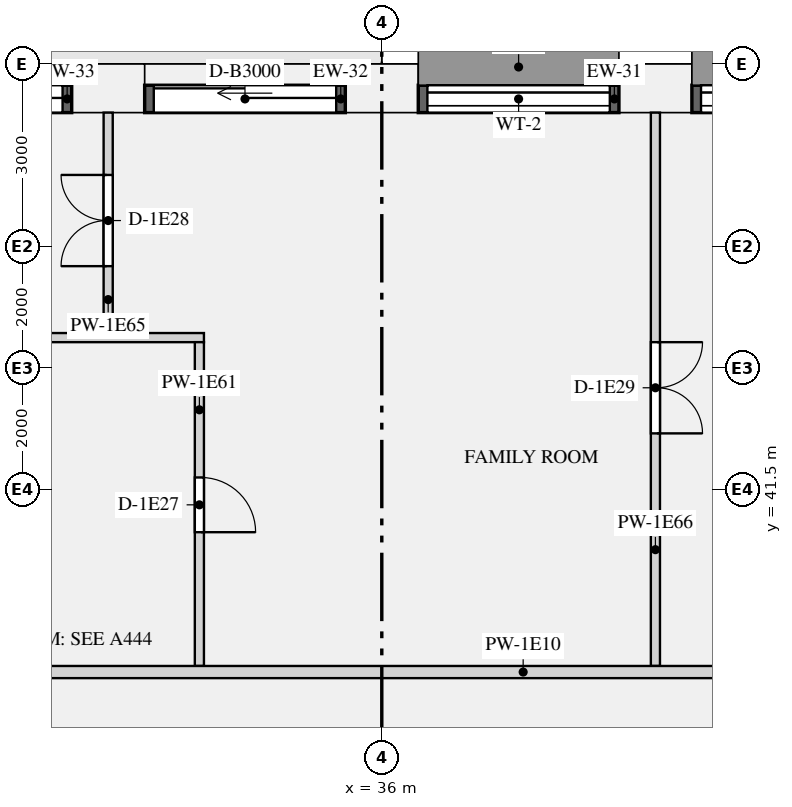
"""IFC4 building model, lengths in metres.
Left out: names, types, materials, properties, quantities, classifications, styles, units other than length and angle.
Written with IfcOpenShell. Run it as: python <this file> out.ifc"""

import sys

from ifc_helpers import new_model, si_unit, direction, frame, frame_2d, origin, origin_2d, place, context, subcontext, project, spatial, rectangle, extrude, element, fill, save


model = new_model("IFC4")
c1 = context("Model", 3, precision=1e-05, world=origin(), true_north=direction((0.0, 1.0)))
c2 = subcontext(c1, "Body", "Model", "MODEL_VIEW")
j1 = project(units=[si_unit("LENGTHUNIT", "METRE"), si_unit("PLANEANGLEUNIT", "RADIAN")], contexts=[c1])
p1 = place(None, origin())
s1 = spatial("IfcSite", under=j1, at=p1, CompositionType="ELEMENT")
p2 = place(p1, origin())
s2 = spatial("IfcBuilding", under=s1, at=p2, CompositionType="ELEMENT")
p3 = place(p2, frame((0.0, 0.0, 54.15)))
s3 = spatial("IfcBuildingStorey", under=s2, at=p3, CompositionType="ELEMENT", Elevation=54.15)
for number, where, z_axis, x_axis in (
    (1, (40.5, 48.1, 0.0), (0.0, 0.0, 1.0), (-1.0, 0.0, 0.0)),
    (2, (36.0, 48.1, 0.0), (0.0, 0.0, 1.0), (-1.0, 0.0, 0.0)),
    (3, (31.5, 48.1, 0.0), (0.0, 0.0, 1.0), (-1.0, 0.0, 0.0)),
):
    element("IfcColumn", number, at=place(p3, frame(where, z_axis=z_axis, x_axis=x_axis)), inside=s3, PredefinedType="USERDEFINED", context=c2, shape_type="SweptSolid", body=[
        extrude(rectangle(XDim=1.2, YDim=0.8, at=origin_2d()), origin(), (0.0, 0.0, 1.0), 3.15),
    ])
p4 = place(p3, frame((44.4, 47.925, 0.9), z_axis=(0.0, 0.0, 1.0), x_axis=(-1.0, 0.0, 0.0)))
e4 = element("IfcWall", 4, at=p4, inside=s3, PredefinedType="SOLIDWALL", context=c2, shape_type="SweptSolid", body=[
    extrude(rectangle(XDim=3.3, YDim=0.45, at=frame_2d((1.65, 0.0))), origin(), (0.0, 0.0, 1.0), 1.93),
])
p5 = place(p4, frame((0.15, 0.0, 0.15)))
e5 = element("IfcOpeningElement", 5, at=p5, cuts=e4, PredefinedType="OPENING", context=c2, shape_type="SweptSolid", body=[
    extrude(rectangle(XDim=3.0, YDim=1.5, at=frame_2d((1.5, 0.75))), frame((0.0, 0.235, 0.0), z_axis=(0.0, -1.0, 0.0), x_axis=(1.0, 0.0, 0.0)), (0.0, 0.0, 1.0), 0.47),
])
p6 = place(p3, frame((39.9, 47.925, 0.9), z_axis=(0.0, 0.0, 1.0), x_axis=(-1.0, 0.0, 0.0)))
e6 = element("IfcWall", 6, at=p6, inside=s3, PredefinedType="SOLIDWALL", context=c2, shape_type="SweptSolid", body=[
    extrude(rectangle(XDim=3.3, YDim=0.45, at=frame_2d((1.65, 0.0))), origin(), (0.0, 0.0, 1.0), 1.93),
])
p7 = place(p6, frame((0.15, 0.0, 0.15)))
e7 = element("IfcOpeningElement", 7, at=p7, cuts=e6, PredefinedType="OPENING", context=c2, shape_type="SweptSolid", body=[
    extrude(rectangle(XDim=3.0, YDim=1.5, at=frame_2d((1.5, 0.75))), frame((0.0, 0.235, 0.0), z_axis=(0.0, -1.0, 0.0), x_axis=(1.0, 0.0, 0.0)), (0.0, 0.0, 1.0), 0.47),
])
p8 = place(p3, frame((35.4, 47.925, 0.0), z_axis=(0.0, 0.0, 1.0), x_axis=(-1.0, 0.0, 0.0)))
e8 = element("IfcWall", 8, at=p8, inside=s3, PredefinedType="SOLIDWALL", context=c2, shape_type="SweptSolid", body=[
    extrude(rectangle(XDim=3.3, YDim=0.45, at=frame_2d((1.65, 0.0))), origin(), (0.0, 0.0, 1.0), 2.83),
])
p9 = place(p8, frame((0.15, 0.0, 0.0)))
e9 = element("IfcOpeningElement", 9, at=p9, cuts=e8, PredefinedType="OPENING", context=c2, shape_type="SweptSolid", body=[
    extrude(rectangle(XDim=3.0, YDim=2.3, at=frame_2d((1.5, 1.15))), frame((0.0, 0.235, 0.0), z_axis=(0.0, -1.0, 0.0), x_axis=(1.0, 0.0, 0.0)), (0.0, 0.0, 1.0), 0.47),
])
p10 = place(p3, frame((30.9, 47.925, 0.0), z_axis=(0.0, 0.0, 1.0), x_axis=(-1.0, 0.0, 0.0)))
e10 = element("IfcWall", 10, at=p10, inside=s3, PredefinedType="SOLIDWALL", context=c2, shape_type="SweptSolid", body=[
    extrude(rectangle(XDim=3.3, YDim=0.45, at=frame_2d((1.65, 0.0))), origin(), (0.0, 0.0, 1.0), 2.83),
])
p11 = place(p10, frame((0.15, 0.0, 0.0)))
e11 = element("IfcOpeningElement", 11, at=p11, cuts=e10, PredefinedType="OPENING", context=c2, shape_type="SweptSolid", body=[
    extrude(rectangle(XDim=3.0, YDim=2.3, at=frame_2d((1.5, 1.15))), frame((0.0, 0.235, 0.0), z_axis=(0.0, -1.0, 0.0), x_axis=(1.0, 0.0, 0.0)), (0.0, 0.0, 1.0), 0.47),
])
p12 = place(p3, frame((23.9, 38.5, 0.0), z_axis=(0.0, 0.0, 1.0), x_axis=(1.0, 0.0, 0.0)))
e12 = element("IfcWall", 12, at=p12, inside=s3, PredefinedType="PARTITIONING", context=c2, shape_type="SweptSolid", body=[
    extrude(rectangle(XDim=24.2, YDim=0.2, at=frame_2d((12.1, 0.0))), origin(), (0.0, 0.0, 1.0), 2.83),
])
p13 = place(p12, frame((3.55, 0.0, 0.0)))
e13 = element("IfcOpeningElement", 13, at=p13, cuts=e12, PredefinedType="OPENING", context=c2, shape_type="SweptSolid", body=[
    extrude(rectangle(XDim=1.1, YDim=2.1, at=frame_2d((0.55, 1.05))), frame((0.0, 0.11, 0.0), z_axis=(0.0, -1.0, 0.0), x_axis=(1.0, 0.0, 0.0)), (0.0, 0.0, 1.0), 0.22),
])
p14 = place(p3, frame((5.3, 44.0, 0.0), z_axis=(0.0, 0.0, 1.0), x_axis=(1.0, 0.0, 0.0)))
e14 = element("IfcWall", 14, at=p14, inside=s3, PredefinedType="PARTITIONING", context=c2, shape_type="SweptSolid", body=[
    extrude(rectangle(XDim=27.775, YDim=0.15, at=frame_2d((13.887, 0.0))), origin(), (0.0, 0.0, 1.0), 2.83),
])
p15 = place(p14, frame((14.5, 0.0, 0.0)))
e15 = element("IfcOpeningElement", 15, at=p15, cuts=e14, PredefinedType="OPENING", context=c2, shape_type="SweptSolid", body=[
    extrude(rectangle(XDim=0.9, YDim=2.1, at=frame_2d((0.45, 1.05))), frame((0.0, 0.085, 0.0), z_axis=(0.0, -1.0, 0.0), x_axis=(1.0, 0.0, 0.0)), (0.0, 0.0, 1.0), 0.17),
])
p16 = place(p14, frame((19.0, 0.0, 0.0)))
e16 = element("IfcOpeningElement", 16, at=p16, cuts=e14, PredefinedType="OPENING", context=c2, shape_type="SweptSolid", body=[
    extrude(rectangle(XDim=0.9, YDim=2.1, at=frame_2d((0.45, 1.05))), frame((0.0, 0.085, 0.0), z_axis=(0.0, -1.0, 0.0), x_axis=(1.0, 0.0, 0.0)), (0.0, 0.0, 1.0), 0.17),
])
p17 = place(p14, frame((9.35, 0.0, 0.0)))
e17 = element("IfcOpeningElement", 17, at=p17, cuts=e14, PredefinedType="OPENING", context=c2, shape_type="SweptSolid", body=[
    extrude(rectangle(XDim=0.9, YDim=2.1, at=frame_2d((0.45, 1.05))), frame((0.0, 0.085, 0.0), z_axis=(0.0, -1.0, 0.0), x_axis=(1.0, 0.0, 0.0)), (0.0, 0.0, 1.0), 0.17),
])
p18 = place(p14, frame((23.5, 0.0, 0.0)))
e18 = element("IfcOpeningElement", 18, at=p18, cuts=e14, PredefinedType="OPENING", context=c2, shape_type="SweptSolid", body=[
    extrude(rectangle(XDim=0.9, YDim=2.1, at=frame_2d((0.45, 1.05))), frame((0.0, 0.085, 0.0), z_axis=(0.0, -1.0, 0.0), x_axis=(1.0, 0.0, 0.0)), (0.0, 0.0, 1.0), 0.17),
])
p19 = place(p14, frame((1.325, 0.0, 0.0)))
e19 = element("IfcOpeningElement", 19, at=p19, cuts=e14, PredefinedType="OPENING", context=c2, shape_type="SweptSolid", body=[
    extrude(rectangle(XDim=0.9, YDim=2.1, at=frame_2d((0.45, 1.05))), frame((0.0, 0.085, 0.0), z_axis=(0.0, -1.0, 0.0), x_axis=(1.0, 0.0, 0.0)), (0.0, 0.0, 1.0), 0.17),
])
p20 = place(p3, frame((33.0, 38.6, 0.0), z_axis=(0.0, 0.0, 1.0), x_axis=(0.0, 1.0, 0.0)))
e20 = element("IfcWall", 20, at=p20, inside=s3, PredefinedType="PARTITIONING", context=c2, shape_type="SweptSolid", body=[
    extrude(rectangle(XDim=5.325, YDim=0.15, at=frame_2d((2.663, 0.0))), origin(), (0.0, 0.0, 1.0), 2.83),
])
p21 = place(p20, frame((2.2, 0.0, 0.0)))
e21 = element("IfcOpeningElement", 21, at=p21, cuts=e20, PredefinedType="OPENING", context=c2, shape_type="SweptSolid", body=[
    extrude(rectangle(XDim=0.9, YDim=2.1, at=frame_2d((0.45, 1.05))), frame((0.0, 0.085, 0.0), z_axis=(0.0, -1.0, 0.0), x_axis=(1.0, 0.0, 0.0)), (0.0, 0.0, 1.0), 0.17),
])
p22 = place(p3, frame((31.5, 44.075, 0.0), z_axis=(0.0, 0.0, 1.0), x_axis=(0.0, 1.0, 0.0)))
e22 = element("IfcWall", 22, at=p22, inside=s3, PredefinedType="PARTITIONING", context=c2, shape_type="SweptSolid", body=[
    extrude(rectangle(XDim=3.625, YDim=0.15, at=frame_2d((1.812, 0.0))), origin(), (0.0, 0.0, 1.0), 2.83),
])
p23 = place(p22, frame((1.1, 0.0, 0.0)))
e23 = element("IfcOpeningElement", 23, at=p23, cuts=e22, PredefinedType="OPENING", context=c2, shape_type="SweptSolid", body=[
    extrude(rectangle(XDim=1.5, YDim=2.1, at=frame_2d((0.75, 1.05))), frame((0.0, 0.085, 0.0), z_axis=(0.0, -1.0, 0.0), x_axis=(1.0, 0.0, 0.0)), (0.0, 0.0, 1.0), 0.17),
])
p24 = place(p3, frame((40.5, 38.6, 0.0), z_axis=(0.0, 0.0, 1.0), x_axis=(0.0, 1.0, 0.0)))
e24 = element("IfcWall", 24, at=p24, inside=s3, PredefinedType="PARTITIONING", context=c2, shape_type="SweptSolid", body=[
    extrude(rectangle(XDim=9.1, YDim=0.15, at=frame_2d((4.55, 0.0))), origin(), (0.0, 0.0, 1.0), 2.83),
])
p25 = place(p24, frame((3.825, 0.0, 0.0)))
e25 = element("IfcOpeningElement", 25, at=p25, cuts=e24, PredefinedType="OPENING", context=c2, shape_type="SweptSolid", body=[
    extrude(rectangle(XDim=1.5, YDim=2.1, at=frame_2d((0.75, 1.05))), frame((0.0, 0.085, 0.0), z_axis=(0.0, -1.0, 0.0), x_axis=(1.0, 0.0, 0.0)), (0.0, 0.0, 1.0), 0.17),
])
p26 = place(p5, origin())
e26 = element("IfcWindow", 26, at=p26, inside=s3, PartitioningType="SINGLE_PANEL", PredefinedType="WINDOW", context=c2, shape_type="SweptSolid", body=[
    extrude(rectangle(XDim=3.0, YDim=1.5, at=frame_2d((1.5, 0.75))), frame((0.0, -0.065, 0.0), z_axis=(0.0, -1.0, 0.0), x_axis=(1.0, 0.0, 0.0)), (0.0, 0.0, 1.0), 0.06),
])
fill(e5, e26)
p27 = place(p7, origin())
e27 = element("IfcWindow", 27, at=p27, inside=s3, PartitioningType="SINGLE_PANEL", PredefinedType="WINDOW", context=c2, shape_type="SweptSolid", body=[
    extrude(rectangle(XDim=3.0, YDim=1.5, at=frame_2d((1.5, 0.75))), frame((0.0, -0.065, 0.0), z_axis=(0.0, -1.0, 0.0), x_axis=(1.0, 0.0, 0.0)), (0.0, 0.0, 1.0), 0.06),
])
fill(e7, e27)
p28 = place(p9, origin())
e28 = element("IfcDoor", 28, at=p28, inside=s3, OperationType="SLIDING_TO_LEFT", PredefinedType="DOOR", context=c2, shape_type="SweptSolid", body=[
    extrude(rectangle(XDim=3.0, YDim=2.3, at=frame_2d((1.5, 1.15))), frame((0.0, -0.07, 0.0), z_axis=(0.0, -1.0, 0.0), x_axis=(1.0, 0.0, 0.0)), (0.0, 0.0, 1.0), 0.05),
])
fill(e9, e28)
p29 = place(p11, origin())
e29 = element("IfcDoor", 29, at=p29, inside=s3, OperationType="SLIDING_TO_LEFT", PredefinedType="DOOR", context=c2, shape_type="SweptSolid", body=[
    extrude(rectangle(XDim=3.0, YDim=2.3, at=frame_2d((1.5, 1.15))), frame((0.0, -0.07, 0.0), z_axis=(0.0, -1.0, 0.0), x_axis=(1.0, 0.0, 0.0)), (0.0, 0.0, 1.0), 0.05),
])
fill(e11, e29)
p30 = place(p21, frame((0.9, 0.0, 0.0), z_axis=(0.0, 0.0, 1.0), x_axis=(-1.0, 0.0, 0.0)))
e30 = element("IfcDoor", 30, at=p30, inside=s3, OperationType="SINGLE_SWING_RIGHT", PredefinedType="DOOR", context=c2, shape_type="SweptSolid", body=[
    extrude(rectangle(XDim=0.9, YDim=2.1, at=frame_2d((0.45, 1.05))), frame((0.0, 0.025, 0.0), z_axis=(0.0, -1.0, 0.0), x_axis=(1.0, 0.0, 0.0)), (0.0, 0.0, 1.0), 0.05),
])
fill(e21, e30)
p31 = place(p23, origin())
e31 = element("IfcDoor", 31, at=p31, inside=s3, OperationType="DOUBLE_DOOR_SINGLE_SWING", PredefinedType="DOOR", context=c2, shape_type="SweptSolid", body=[
    extrude(rectangle(XDim=1.5, YDim=2.1, at=frame_2d((0.75, 1.05))), frame((0.0, 0.025, 0.0), z_axis=(0.0, -1.0, 0.0), x_axis=(1.0, 0.0, 0.0)), (0.0, 0.0, 1.0), 0.05),
])
fill(e23, e31)
p32 = place(p25, frame((1.5, 0.0, 0.0), z_axis=(0.0, 0.0, 1.0), x_axis=(-1.0, 0.0, 0.0)))
e32 = element("IfcDoor", 32, at=p32, inside=s3, OperationType="DOUBLE_DOOR_SINGLE_SWING", PredefinedType="DOOR", context=c2, shape_type="SweptSolid", body=[
    extrude(rectangle(XDim=1.5, YDim=2.1, at=frame_2d((0.75, 1.05))), frame((0.0, 0.025, 0.0), z_axis=(0.0, -1.0, 0.0), x_axis=(1.0, 0.0, 0.0)), (0.0, 0.0, 1.0), 0.05),
])
fill(e25, e32)
save(model, sys.argv[1])
